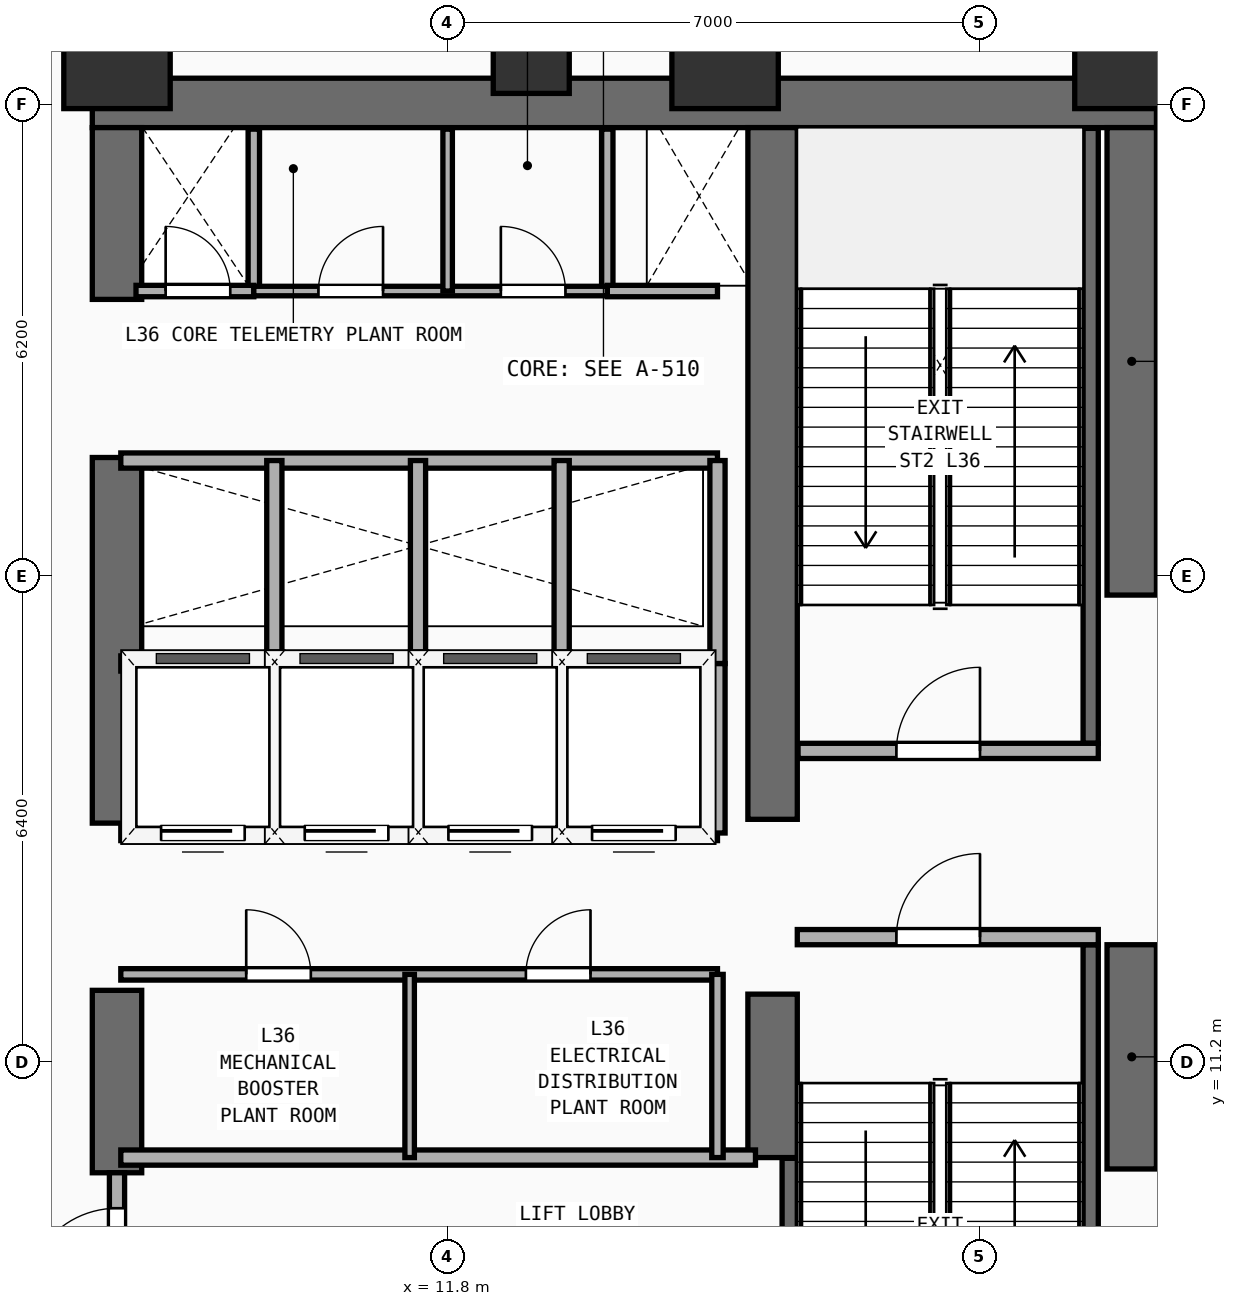
"""IFC4 building model, lengths in metres.
Left out: names, types, materials, properties, quantities, classifications, styles, units other than length and angle.
Written with IfcOpenShell. Run it as: python <this file> out.ifc"""

import sys

from ifc_helpers import new_model, si_unit, direction, frame, frame_2d, origin, origin_2d, place, context, subcontext, project, spatial, rectangle, extrude, element, fill, save


model = new_model("IFC4")
c1 = context("Model", 3, precision=1e-05, world=origin(), true_north=direction((0.0, 1.0)))
c2 = subcontext(c1, "Body", "Model", "MODEL_VIEW")
j1 = project(units=[si_unit("LENGTHUNIT", "METRE"), si_unit("PLANEANGLEUNIT", "RADIAN")], contexts=[c1])
p1 = place(None, origin())
s1 = spatial("IfcSite", under=j1, at=p1, CompositionType="ELEMENT")
p2 = place(p1, origin())
s2 = spatial("IfcBuilding", under=s1, at=p2, CompositionType="ELEMENT")
p3 = place(p2, frame((0.0, 0.0, 141.1)))
s3 = spatial("IfcBuildingStorey", under=s2, at=p3, CompositionType="ELEMENT", Elevation=141.1)
p4 = place(p3, frame((7.125, 23.825, 0.0), z_axis=(0.0, 0.0, 1.0), x_axis=(1.0, 0.0, 0.0)))
e1 = element("IfcWall", 1, at=p4, inside=s3, PredefinedType="SHEAR", context=c2, shape_type="SweptSolid", body=[
    extrude(rectangle(XDim=14.0, YDim=0.65, at=frame_2d((7.0, 0.0))), origin(), (0.0, 0.0, 1.0), 4.86),
])
p5 = place(p3, frame((7.45, 9.75, 0.0), z_axis=(0.0, 0.0, 1.0), x_axis=(0.0, 1.0, 0.0)))
e2 = element("IfcWall", 2, at=p5, inside=s3, PredefinedType="SHEAR", context=c2, shape_type="SweptSolid", body=[
    extrude(rectangle(XDim=2.4, YDim=0.65, at=frame_2d((1.2, 0.0))), origin(), (0.0, 0.0, 1.0), 4.86),
])
p6 = place(p3, frame((7.45, 14.35, 0.0), z_axis=(0.0, 0.0, 1.0), x_axis=(0.0, 1.0, 0.0)))
e3 = element("IfcWall", 3, at=p6, inside=s3, PredefinedType="SHEAR", context=c2, shape_type="SweptSolid", body=[
    extrude(rectangle(XDim=4.81, YDim=0.65, at=frame_2d((2.405, 0.0))), origin(), (0.0, 0.0, 1.0), 4.86),
])
p7 = place(p3, frame((7.45, 21.24, 0.0), z_axis=(0.0, 0.0, 1.0), x_axis=(0.0, 1.0, 0.0)))
e4 = element("IfcWall", 4, at=p7, inside=s3, PredefinedType="SHEAR", context=c2, shape_type="SweptSolid", body=[
    extrude(rectangle(XDim=2.26, YDim=0.65, at=frame_2d((1.13, 0.0))), origin(), (0.0, 0.0, 1.0), 4.86),
])
p8 = place(p3, frame((20.8, 9.8, 0.0), z_axis=(0.0, 0.0, 1.0), x_axis=(0.0, 1.0, 0.0)))
e5 = element("IfcWall", 5, at=p8, inside=s3, PredefinedType="SHEAR", context=c2, shape_type="SweptSolid", body=[
    extrude(rectangle(XDim=2.95, YDim=0.65, at=frame_2d((1.475, 0.0))), origin(), (0.0, 0.0, 1.0), 4.86),
])
p9 = place(p3, frame((20.8, 17.35, 0.0), z_axis=(0.0, 0.0, 1.0), x_axis=(0.0, 1.0, 0.0)))
e6 = element("IfcWall", 6, at=p9, inside=s3, PredefinedType="SHEAR", context=c2, shape_type="SweptSolid", body=[
    extrude(rectangle(XDim=6.15, YDim=0.65, at=frame_2d((3.075, 0.0))), origin(), (0.0, 0.0, 1.0), 4.86),
])
p10 = place(p3, frame((16.075, 9.95, 0.0), z_axis=(0.0, 0.0, 1.0), x_axis=(0.0, 1.0, 0.0)))
e7 = element("IfcWall", 7, at=p10, inside=s3, PredefinedType="SHEAR", context=c2, shape_type="SweptSolid", body=[
    extrude(rectangle(XDim=2.15, YDim=0.65, at=frame_2d((1.075, 0.0))), origin(), (0.0, 0.0, 1.0), 4.86),
])
p11 = place(p3, frame((16.075, 14.4, 0.0), z_axis=(0.0, 0.0, 1.0), x_axis=(0.0, 1.0, 0.0)))
e8 = element("IfcWall", 8, at=p11, inside=s3, PredefinedType="SHEAR", context=c2, shape_type="SweptSolid", body=[
    extrude(rectangle(XDim=9.1, YDim=0.65, at=frame_2d((4.55, 0.0))), origin(), (0.0, 0.0, 1.0), 4.86),
])
for number, where, z_axis, x_axis in (
    (9, (7.45, 24.45, 0.0), (0.0, 0.0, 1.0), (1.0, 0.0, 0.0)),
    (10, (15.45, 24.45, 0.0), (0.0, 0.0, 1.0), (1.0, 0.0, 0.0)),
    (11, (20.75, 24.45, 0.0), (0.0, 0.0, 1.0), (1.0, 0.0, 0.0)),
):
    element("IfcColumn", number, at=place(p3, frame(where, z_axis=z_axis, x_axis=x_axis)), inside=s3, PredefinedType="COLUMN", context=c2, shape_type="SweptSolid", body=[
        extrude(rectangle(XDim=1.4, YDim=1.4, at=origin_2d()), origin(), (0.0, 0.0, 1.0), 4.86),
    ])
p12 = place(p3, frame((12.9, 24.45, 0.0), z_axis=(0.0, 0.0, 1.0), x_axis=(1.0, 0.0, 0.0)))
e12 = element("IfcColumn", 12, at=p12, inside=s3, PredefinedType="COLUMN", context=c2, shape_type="SweptSolid", body=[
    extrude(rectangle(XDim=1.0, YDim=1.0, at=origin_2d()), origin(), (0.0, 0.0, 1.0), 4.86),
])
p13 = place(p3, frame((16.3, 7.36, 0.0), z_axis=(0.0, 0.0, 1.0), x_axis=(0.0, 1.0, 0.0)))
e13 = element("IfcWall", 13, at=p13, inside=s3, PredefinedType="SHEAR", context=c2, shape_type="SweptSolid", body=[
    extrude(rectangle(XDim=2.58, YDim=0.2, at=frame_2d((1.29, 0.0))), origin(), (0.0, 0.0, 1.0), 4.86),
])
p14 = place(p3, frame((20.26, 4.66, 0.0), z_axis=(0.0, 0.0, 1.0), x_axis=(0.0, 1.0, 0.0)))
e14 = element("IfcWall", 14, at=p14, inside=s3, PredefinedType="SHEAR", context=c2, shape_type="SweptSolid", body=[
    extrude(rectangle(XDim=8.09, YDim=0.2, at=frame_2d((4.045, 0.0))), origin(), (0.0, 0.0, 1.0), 4.86),
])
p15 = place(p3, frame((16.4, 12.85, 0.0), z_axis=(0.0, 0.0, 1.0), x_axis=(1.0, 0.0, 0.0)))
e15 = element("IfcWall", 15, at=p15, inside=s3, PredefinedType="PARTITIONING", context=c2, shape_type="SweptSolid", body=[
    extrude(rectangle(XDim=3.96, YDim=0.2, at=frame_2d((1.98, 0.0))), origin(), (0.0, 0.0, 1.0), 4.86),
])
p16 = place(p15, frame((1.304, 0.0, 0.0)))
e16 = element("IfcOpeningElement", 16, at=p16, cuts=e15, PredefinedType="OPENING", context=c2, shape_type="SweptSolid", body=[
    extrude(rectangle(XDim=1.1, YDim=2.2, at=frame_2d((0.55, 1.1))), frame((0.0, 0.11, 0.0), z_axis=(0.0, -1.0, 0.0), x_axis=(1.0, 0.0, 0.0)), (0.0, 0.0, 1.0), 0.22),
])
p17 = place(p3, frame((20.26, 15.4, 0.0), z_axis=(0.0, 0.0, 1.0), x_axis=(0.0, 1.0, 0.0)))
e17 = element("IfcWall", 17, at=p17, inside=s3, PredefinedType="SHEAR", context=c2, shape_type="SweptSolid", body=[
    extrude(rectangle(XDim=8.09, YDim=0.2, at=frame_2d((4.045, 0.0))), origin(), (0.0, 0.0, 1.0), 4.86),
])
p18 = place(p3, frame((16.41, 15.3, 0.0), z_axis=(0.0, 0.0, 1.0), x_axis=(1.0, 0.0, 0.0)))
e18 = element("IfcWall", 18, at=p18, inside=s3, PredefinedType="PARTITIONING", context=c2, shape_type="SweptSolid", body=[
    extrude(rectangle(XDim=3.95, YDim=0.2, at=frame_2d((1.975, 0.0))), origin(), (0.0, 0.0, 1.0), 4.86),
])
p19 = place(p18, frame((1.294, 0.0, 0.0)))
e19 = element("IfcOpeningElement", 19, at=p19, cuts=e18, PredefinedType="OPENING", context=c2, shape_type="SweptSolid", body=[
    extrude(rectangle(XDim=1.1, YDim=2.2, at=frame_2d((0.55, 1.1))), frame((0.0, 0.11, 0.0), z_axis=(0.0, -1.0, 0.0), x_axis=(1.0, 0.0, 0.0)), (0.0, 0.0, 1.0), 0.22),
])
p20 = place(p3, frame((7.5, 9.95, 0.0), z_axis=(0.0, 0.0, 1.0), x_axis=(1.0, 0.0, 0.0)))
e20 = element("IfcWall", 20, at=p20, inside=s3, PredefinedType="PARTITIONING", context=c2, shape_type="SweptSolid", body=[
    extrude(rectangle(XDim=8.35, YDim=0.2, at=frame_2d((4.175, 0.0))), origin(), (0.0, 0.0, 1.0), 4.86),
])
p21 = place(p3, frame((7.45, 7.45, 0.0), z_axis=(0.0, 0.0, 1.0), x_axis=(0.0, 1.0, 0.0)))
e21 = element("IfcWall", 21, at=p21, inside=s3, PredefinedType="PARTITIONING", context=c2, shape_type="SweptSolid", body=[
    extrude(rectangle(XDim=2.3, YDim=0.2, at=frame_2d((1.15, 0.0))), origin(), (0.0, 0.0, 1.0), 3.64),
])
p22 = place(p21, frame((0.633, 0.0, 0.0)))
e22 = element("IfcOpeningElement", 22, at=p22, cuts=e21, PredefinedType="OPENING", context=c2, shape_type="SweptSolid", body=[
    extrude(rectangle(XDim=1.2, YDim=2.25, at=frame_2d((0.6, 1.125))), frame((0.0, 0.11, 0.0), z_axis=(0.0, -1.0, 0.0), x_axis=(1.0, 0.0, 0.0)), (0.0, 0.0, 1.0), 0.22),
])
p23 = place(p3, frame((7.5, 12.36, 0.0), z_axis=(0.0, 0.0, 1.0), x_axis=(1.0, 0.0, 0.0)))
e23 = element("IfcWall", 23, at=p23, inside=s3, PredefinedType="PARTITIONING", context=c2, shape_type="SweptSolid", body=[
    extrude(rectangle(XDim=7.85, YDim=0.15, at=frame_2d((3.925, 0.0))), origin(), (0.0, 0.0, 1.0), 4.86),
])
p24 = place(p23, frame((1.65, 0.0, 0.0)))
e24 = element("IfcOpeningElement", 24, at=p24, cuts=e23, PredefinedType="OPENING", context=c2, shape_type="SweptSolid", body=[
    extrude(rectangle(XDim=0.85, YDim=2.15, at=frame_2d((0.425, 1.075))), frame((0.0, 0.085, 0.0), z_axis=(0.0, -1.0, 0.0), x_axis=(1.0, 0.0, 0.0)), (0.0, 0.0, 1.0), 0.17),
])
p25 = place(p23, frame((5.329, 0.0, 0.0)))
e25 = element("IfcOpeningElement", 25, at=p25, cuts=e23, PredefinedType="OPENING", context=c2, shape_type="SweptSolid", body=[
    extrude(rectangle(XDim=0.85, YDim=2.15, at=frame_2d((0.425, 1.075))), frame((0.0, 0.085, 0.0), z_axis=(0.0, -1.0, 0.0), x_axis=(1.0, 0.0, 0.0)), (0.0, 0.0, 1.0), 0.17),
])
p26 = place(p3, frame((15.35, 9.95, 0.0), z_axis=(0.0, 0.0, 1.0), x_axis=(0.0, 1.0, 0.0)))
e26 = element("IfcWall", 26, at=p26, inside=s3, PredefinedType="PARTITIONING", context=c2, shape_type="SweptSolid", body=[
    extrude(rectangle(XDim=2.41, YDim=0.15, at=frame_2d((1.205, 0.0))), origin(), (0.0, 0.0, 1.0), 4.86),
])
p27 = place(p3, frame((11.3, 9.95, 0.0), z_axis=(0.0, 0.0, 1.0), x_axis=(0.0, 1.0, 0.0)))
e27 = element("IfcWall", 27, at=p27, inside=s3, PredefinedType="PARTITIONING", context=c2, shape_type="SweptSolid", body=[
    extrude(rectangle(XDim=2.41, YDim=0.125, at=frame_2d((1.205, 0.0))), origin(), (0.0, 0.0, 1.0), 4.86),
])
p28 = place(p3, frame((7.5, 14.22, 0.0), z_axis=(0.0, 0.0, 1.0), x_axis=(1.0, 0.0, 0.0)))
e28 = element("IfcWall", 28, at=p28, inside=s3, PredefinedType="PARTITIONING", context=c2, shape_type="SweptSolid", body=[
    extrude(rectangle(XDim=7.85, YDim=0.2, at=frame_2d((3.925, 0.0))), origin(), (0.0, 0.0, 1.0), 4.86),
])
p29 = place(p28, frame((0.53, 0.0, 0.0)))
e29 = element("IfcOpeningElement", 29, at=p29, cuts=e28, PredefinedType="OPENING", context=c2, shape_type="SweptSolid", body=[
    extrude(rectangle(XDim=1.1, YDim=2.2, at=frame_2d((0.55, 1.1))), frame((0.0, 0.11, 0.0), z_axis=(0.0, -1.0, 0.0), x_axis=(1.0, 0.0, 0.0)), (0.0, 0.0, 1.0), 0.22),
])
p30 = place(p28, frame((2.42, 0.0, 0.0)))
e30 = element("IfcOpeningElement", 30, at=p30, cuts=e28, PredefinedType="OPENING", context=c2, shape_type="SweptSolid", body=[
    extrude(rectangle(XDim=1.1, YDim=2.2, at=frame_2d((0.55, 1.1))), frame((0.0, 0.11, 0.0), z_axis=(0.0, -1.0, 0.0), x_axis=(1.0, 0.0, 0.0)), (0.0, 0.0, 1.0), 0.22),
])
p31 = place(p28, frame((4.31, 0.0, 0.0)))
e31 = element("IfcOpeningElement", 31, at=p31, cuts=e28, PredefinedType="OPENING", context=c2, shape_type="SweptSolid", body=[
    extrude(rectangle(XDim=1.1, YDim=2.2, at=frame_2d((0.55, 1.1))), frame((0.0, 0.11, 0.0), z_axis=(0.0, -1.0, 0.0), x_axis=(1.0, 0.0, 0.0)), (0.0, 0.0, 1.0), 0.22),
])
p32 = place(p28, frame((6.2, 0.0, 0.0)))
e32 = element("IfcOpeningElement", 32, at=p32, cuts=e28, PredefinedType="OPENING", context=c2, shape_type="SweptSolid", body=[
    extrude(rectangle(XDim=1.1, YDim=2.2, at=frame_2d((0.55, 1.1))), frame((0.0, 0.11, 0.0), z_axis=(0.0, -1.0, 0.0), x_axis=(1.0, 0.0, 0.0)), (0.0, 0.0, 1.0), 0.22),
])
p33 = place(p3, frame((7.5, 16.45, 0.0), z_axis=(0.0, 0.0, 1.0), x_axis=(1.0, 0.0, 0.0)))
e33 = element("IfcWall", 33, at=p33, inside=s3, PredefinedType="PARTITIONING", context=c2, shape_type="SweptSolid", body=[
    extrude(rectangle(XDim=7.85, YDim=0.2, at=frame_2d((3.925, 0.0))), origin(), (0.0, 0.0, 1.0), 4.86),
])
for number, where, z_axis, x_axis in (
    (34, (15.35, 14.22, 0.0), (0.0, 0.0, 1.0), (0.0, 1.0, 0.0)),
    (35, (9.52, 14.22, 0.0), (0.0, 0.0, 1.0), (0.0, 1.0, 0.0)),
    (36, (11.41, 14.22, 0.0), (0.0, 0.0, 1.0), (0.0, 1.0, 0.0)),
    (37, (13.3, 14.22, 0.0), (0.0, 0.0, 1.0), (0.0, 1.0, 0.0)),
):
    element("IfcWall", number, at=place(p3, frame(where, z_axis=z_axis, x_axis=x_axis)), inside=s3, PredefinedType="PARTITIONING", context=c2, shape_type="SweptSolid", body=[
        extrude(rectangle(XDim=2.23, YDim=0.2, at=frame_2d((1.115, 0.0))), origin(), (0.0, 0.0, 1.0), 4.86),
    ])
p34 = place(p3, frame((7.5, 19.12, 0.0), z_axis=(0.0, 0.0, 1.0), x_axis=(1.0, 0.0, 0.0)))
e38 = element("IfcWall", 38, at=p34, inside=s3, PredefinedType="PARTITIONING", context=c2, shape_type="SweptSolid", body=[
    extrude(rectangle(XDim=7.85, YDim=0.2, at=frame_2d((3.925, 0.0))), origin(), (0.0, 0.0, 1.0), 4.86),
])
for number, where, z_axis, x_axis in (
    (39, (15.35, 16.45, 0.0), (0.0, 0.0, 1.0), (0.0, 1.0, 0.0)),
    (40, (9.52, 16.45, 0.0), (0.0, 0.0, 1.0), (0.0, 1.0, 0.0)),
    (41, (11.41, 16.45, 0.0), (0.0, 0.0, 1.0), (0.0, 1.0, 0.0)),
    (42, (13.3, 16.45, 0.0), (0.0, 0.0, 1.0), (0.0, 1.0, 0.0)),
):
    element("IfcWall", number, at=place(p3, frame(where, z_axis=z_axis, x_axis=x_axis)), inside=s3, PredefinedType="PARTITIONING", context=c2, shape_type="SweptSolid", body=[
        extrude(rectangle(XDim=2.67, YDim=0.2, at=frame_2d((1.335, 0.0))), origin(), (0.0, 0.0, 1.0), 4.86),
    ])
for number, where, z_axis, x_axis in (
    (43, (9.25, 21.35, 0.0), (0.0, 0.0, 1.0), (0.0, 1.0, 0.0)),
    (44, (13.9, 21.35, 0.0), (0.0, 0.0, 1.0), (0.0, 1.0, 0.0)),
):
    element("IfcWall", number, at=place(p3, frame(where, z_axis=z_axis, x_axis=x_axis)), inside=s3, PredefinedType="PARTITIONING", context=c2, shape_type="SweptSolid", body=[
        extrude(rectangle(XDim=2.13, YDim=0.15, at=frame_2d((1.065, 0.0))), origin(), (0.0, 0.0, 1.0), 4.86),
    ])
p35 = place(p3, frame((7.7, 21.35, 0.0), z_axis=(0.0, 0.0, 1.0), x_axis=(1.0, 0.0, 0.0)))
e45 = element("IfcWall", 45, at=p35, inside=s3, PredefinedType="PARTITIONING", context=c2, shape_type="SweptSolid", body=[
    extrude(rectangle(XDim=1.55, YDim=0.15, at=frame_2d((0.775, 0.0))), origin(), (0.0, 0.0, 1.0), 4.86),
])
p36 = place(p35, frame((0.39, 0.0, 0.0)))
e46 = element("IfcOpeningElement", 46, at=p36, cuts=e45, PredefinedType="OPENING", context=c2, shape_type="SweptSolid", body=[
    extrude(rectangle(XDim=0.85, YDim=2.15, at=frame_2d((0.425, 1.075))), frame((0.0, 0.085, 0.0), z_axis=(0.0, -1.0, 0.0), x_axis=(1.0, 0.0, 0.0)), (0.0, 0.0, 1.0), 0.17),
])
p37 = place(p3, frame((13.9, 21.35, 0.0), z_axis=(0.0, 0.0, 1.0), x_axis=(1.0, 0.0, 0.0)))
e47 = element("IfcWall", 47, at=p37, inside=s3, PredefinedType="PARTITIONING", context=c2, shape_type="SweptSolid", body=[
    extrude(rectangle(XDim=1.45, YDim=0.15, at=frame_2d((0.725, 0.0))), origin(), (0.0, 0.0, 1.0), 4.86),
])
p38 = place(p3, frame((9.25, 21.35, 0.0), z_axis=(0.0, 0.0, 1.0), x_axis=(1.0, 0.0, 0.0)))
e48 = element("IfcWall", 48, at=p38, inside=s3, PredefinedType="PARTITIONING", context=c2, shape_type="SweptSolid", body=[
    extrude(rectangle(XDim=4.65, YDim=0.125, at=frame_2d((2.325, 0.0))), origin(), (0.0, 0.0, 1.0), 4.86),
])
p39 = place(p38, frame((0.85, 0.0, 0.0)))
e49 = element("IfcOpeningElement", 49, at=p39, cuts=e48, PredefinedType="OPENING", context=c2, shape_type="SweptSolid", body=[
    extrude(rectangle(XDim=0.85, YDim=2.15, at=frame_2d((0.425, 1.075))), frame((0.0, 0.073, 0.0), z_axis=(0.0, -1.0, 0.0), x_axis=(1.0, 0.0, 0.0)), (0.0, 0.0, 1.0), 0.145),
])
p40 = place(p38, frame((3.25, 0.0, 0.0)))
e50 = element("IfcOpeningElement", 50, at=p40, cuts=e48, PredefinedType="OPENING", context=c2, shape_type="SweptSolid", body=[
    extrude(rectangle(XDim=0.85, YDim=2.15, at=frame_2d((0.425, 1.075))), frame((0.0, 0.073, 0.0), z_axis=(0.0, -1.0, 0.0), x_axis=(1.0, 0.0, 0.0)), (0.0, 0.0, 1.0), 0.145),
])
p41 = place(p3, frame((11.8, 21.35, 0.0), z_axis=(0.0, 0.0, 1.0), x_axis=(0.0, 1.0, 0.0)))
e51 = element("IfcWall", 51, at=p41, inside=s3, PredefinedType="PARTITIONING", context=c2, shape_type="SweptSolid", body=[
    extrude(rectangle(XDim=2.13, YDim=0.125, at=frame_2d((1.065, 0.0))), origin(), (0.0, 0.0, 1.0), 4.86),
])
p42 = place(p16, frame((1.1, 0.0, 0.0), z_axis=(0.0, 0.0, 1.0), x_axis=(-1.0, 0.0, 0.0)))
e52 = element("IfcDoor", 52, at=p42, inside=s3, OperationType="SINGLE_SWING_LEFT", PredefinedType="DOOR", context=c2, shape_type="SweptSolid", body=[
    extrude(rectangle(XDim=1.1, YDim=2.2, at=frame_2d((0.55, 1.1))), frame((0.0, 0.025, 0.0), z_axis=(0.0, -1.0, 0.0), x_axis=(1.0, 0.0, 0.0)), (0.0, 0.0, 1.0), 0.05),
])
fill(e16, e52)
p43 = place(p19, origin())
e53 = element("IfcDoor", 53, at=p43, inside=s3, OperationType="SINGLE_SWING_RIGHT", PredefinedType="DOOR", context=c2, shape_type="SweptSolid", body=[
    extrude(rectangle(XDim=1.1, YDim=2.2, at=frame_2d((0.55, 1.1))), frame((0.0, 0.025, 0.0), z_axis=(0.0, -1.0, 0.0), x_axis=(1.0, 0.0, 0.0)), (0.0, 0.0, 1.0), 0.05),
])
fill(e19, e53)
p44 = place(p22, frame((1.2, 0.0, 0.0), z_axis=(0.0, 0.0, 1.0), x_axis=(-1.0, 0.0, 0.0)))
e54 = element("IfcDoor", 54, at=p44, inside=s3, OperationType="SINGLE_SWING_RIGHT", PredefinedType="DOOR", context=c2, shape_type="SweptSolid", body=[
    extrude(rectangle(XDim=1.2, YDim=2.25, at=frame_2d((0.6, 1.125))), frame((0.0, 0.025, 0.0), z_axis=(0.0, -1.0, 0.0), x_axis=(1.0, 0.0, 0.0)), (0.0, 0.0, 1.0), 0.05),
])
fill(e22, e54)
p45 = place(p24, origin())
e55 = element("IfcDoor", 55, at=p45, inside=s3, OperationType="SINGLE_SWING_LEFT", PredefinedType="DOOR", context=c2, shape_type="SweptSolid", body=[
    extrude(rectangle(XDim=0.85, YDim=2.15, at=frame_2d((0.425, 1.075))), frame((0.0, 0.025, 0.0), z_axis=(0.0, -1.0, 0.0), x_axis=(1.0, 0.0, 0.0)), (0.0, 0.0, 1.0), 0.05),
])
fill(e24, e55)
p46 = place(p25, origin())
e56 = element("IfcDoor", 56, at=p46, inside=s3, OperationType="SINGLE_SWING_RIGHT", PredefinedType="DOOR", context=c2, shape_type="SweptSolid", body=[
    extrude(rectangle(XDim=0.85, YDim=2.15, at=frame_2d((0.425, 1.075))), frame((0.0, 0.025, 0.0), z_axis=(0.0, -1.0, 0.0), x_axis=(1.0, 0.0, 0.0)), (0.0, 0.0, 1.0), 0.05),
])
fill(e25, e56)
p47 = place(p29, frame((1.1, 0.0, 0.0), z_axis=(0.0, 0.0, 1.0), x_axis=(-1.0, 0.0, 0.0)))
e57 = element("IfcDoor", 57, at=p47, inside=s3, OperationType="SLIDING_TO_LEFT", PredefinedType="DOOR", context=c2, shape_type="SweptSolid", body=[
    extrude(rectangle(XDim=1.1, YDim=2.2, at=frame_2d((0.55, 1.1))), frame((0.0, 0.025, 0.0), z_axis=(0.0, -1.0, 0.0), x_axis=(1.0, 0.0, 0.0)), (0.0, 0.0, 1.0), 0.05),
])
fill(e29, e57)
p48 = place(p30, frame((1.1, 0.0, 0.0), z_axis=(0.0, 0.0, 1.0), x_axis=(-1.0, 0.0, 0.0)))
e58 = element("IfcDoor", 58, at=p48, inside=s3, OperationType="SLIDING_TO_LEFT", PredefinedType="DOOR", context=c2, shape_type="SweptSolid", body=[
    extrude(rectangle(XDim=1.1, YDim=2.2, at=frame_2d((0.55, 1.1))), frame((0.0, 0.025, 0.0), z_axis=(0.0, -1.0, 0.0), x_axis=(1.0, 0.0, 0.0)), (0.0, 0.0, 1.0), 0.05),
])
fill(e30, e58)
p49 = place(p31, frame((1.1, 0.0, 0.0), z_axis=(0.0, 0.0, 1.0), x_axis=(-1.0, 0.0, 0.0)))
e59 = element("IfcDoor", 59, at=p49, inside=s3, OperationType="SLIDING_TO_LEFT", PredefinedType="DOOR", context=c2, shape_type="SweptSolid", body=[
    extrude(rectangle(XDim=1.1, YDim=2.2, at=frame_2d((0.55, 1.1))), frame((0.0, 0.025, 0.0), z_axis=(0.0, -1.0, 0.0), x_axis=(1.0, 0.0, 0.0)), (0.0, 0.0, 1.0), 0.05),
])
fill(e31, e59)
p50 = place(p32, frame((1.1, 0.0, 0.0), z_axis=(0.0, 0.0, 1.0), x_axis=(-1.0, 0.0, 0.0)))
e60 = element("IfcDoor", 60, at=p50, inside=s3, OperationType="SLIDING_TO_LEFT", PredefinedType="DOOR", context=c2, shape_type="SweptSolid", body=[
    extrude(rectangle(XDim=1.1, YDim=2.2, at=frame_2d((0.55, 1.1))), frame((0.0, 0.025, 0.0), z_axis=(0.0, -1.0, 0.0), x_axis=(1.0, 0.0, 0.0)), (0.0, 0.0, 1.0), 0.05),
])
fill(e32, e60)
p51 = place(p36, origin())
e61 = element("IfcDoor", 61, at=p51, inside=s3, OperationType="SINGLE_SWING_LEFT", PredefinedType="DOOR", context=c2, shape_type="SweptSolid", body=[
    extrude(rectangle(XDim=0.85, YDim=2.15, at=frame_2d((0.425, 1.075))), frame((0.0, 0.025, 0.0), z_axis=(0.0, -1.0, 0.0), x_axis=(1.0, 0.0, 0.0)), (0.0, 0.0, 1.0), 0.05),
])
fill(e46, e61)
p52 = place(p39, origin())
e62 = element("IfcDoor", 62, at=p52, inside=s3, OperationType="SINGLE_SWING_RIGHT", PredefinedType="DOOR", context=c2, shape_type="SweptSolid", body=[
    extrude(rectangle(XDim=0.85, YDim=2.15, at=frame_2d((0.425, 1.075))), frame((0.0, 0.025, 0.0), z_axis=(0.0, -1.0, 0.0), x_axis=(1.0, 0.0, 0.0)), (0.0, 0.0, 1.0), 0.05),
])
fill(e49, e62)
p53 = place(p40, origin())
e63 = element("IfcDoor", 63, at=p53, inside=s3, OperationType="SINGLE_SWING_LEFT", PredefinedType="DOOR", context=c2, shape_type="SweptSolid", body=[
    extrude(rectangle(XDim=0.85, YDim=2.15, at=frame_2d((0.425, 1.075))), frame((0.0, 0.025, 0.0), z_axis=(0.0, -1.0, 0.0), x_axis=(1.0, 0.0, 0.0)), (0.0, 0.0, 1.0), 0.05),
])
fill(e50, e63)
save(model, sys.argv[1])
